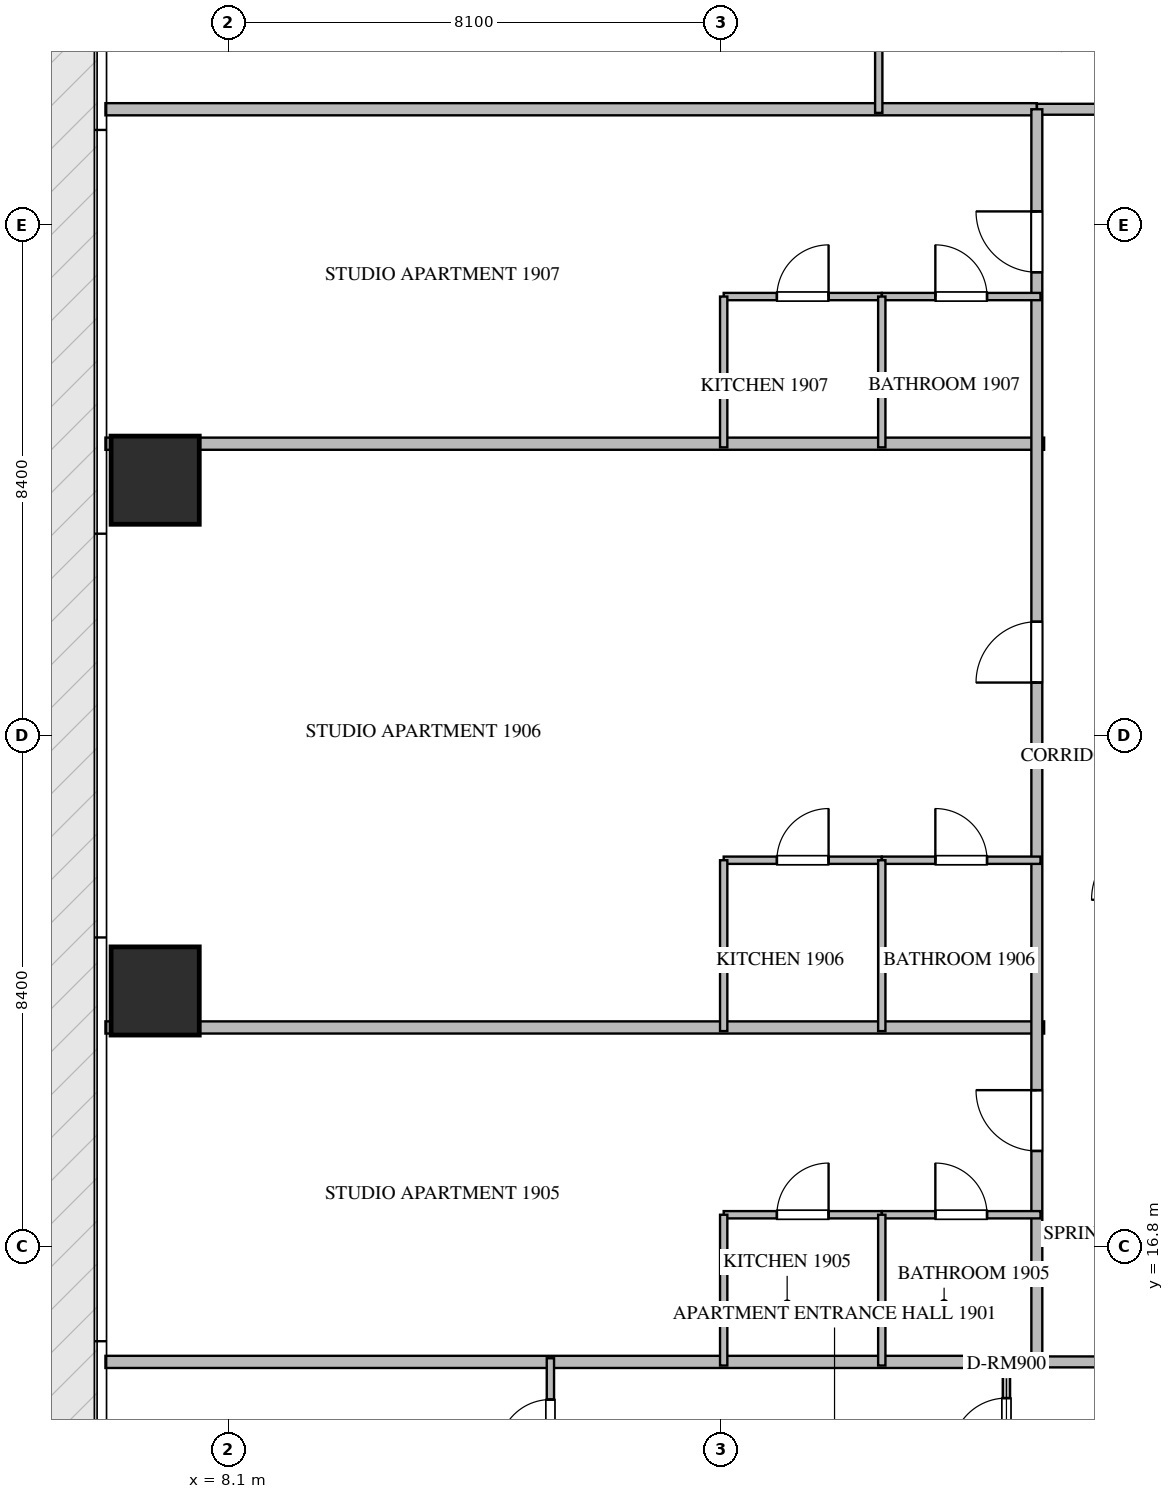
"""IFC4 building model, lengths in metres.
Left out: names, types, materials, properties, quantities, classifications, styles, units other than length and angle.
Written with IfcOpenShell. Run it as: python <this file> out.ifc"""

import sys

from ifc_helpers import new_model, si_unit, direction, frame, frame_2d, origin, origin_2d, place, context, subcontext, project, spatial, rectangle, extrude, source, transform, mapped, element, fill, save


model = new_model("IFC4")
c1 = context("Model", 3, precision=1e-05, world=origin(), true_north=direction((0.0, 1.0)))
c2 = subcontext(c1, "Body", "Model", "MODEL_VIEW")
j1 = project(units=[si_unit("LENGTHUNIT", "METRE"), si_unit("PLANEANGLEUNIT", "RADIAN")], contexts=[c1])
p1 = place(None, origin())
s1 = spatial("IfcSite", under=j1, at=p1, CompositionType="ELEMENT")
p2 = place(p1, origin())
s2 = spatial("IfcBuilding", under=s1, at=p2, CompositionType="ELEMENT")
p3 = place(p2, frame((0.0, 0.0, 79.2)))
s3 = spatial("IfcBuildingStorey", under=s2, at=p3, CompositionType="ELEMENT", Elevation=79.2)
m1 = source(origin(), c2, "Body", "SweptSolid", [
    extrude(rectangle(XDim=1.45, YDim=1.45, at=origin_2d()), origin(), (0.0, 0.0, 1.0), 3.75),
])
for number, where, z_axis, x_axis in (
    (1, (6.9, 21.0, -0.26), (0.0, 0.0, 1.0), (1.0, 0.0, 0.0)),
    (2, (6.9, 29.4, -0.26), (0.0, 0.0, 1.0), (1.0, 0.0, 0.0)),
):
    element("IfcColumn", number, at=place(p3, frame(where, z_axis=z_axis, x_axis=x_axis)), inside=s3, PredefinedType="COLUMN", context=c2, shape_type="MappedRepresentation", body=[
        mapped(m1, transform((0.0, 0.0, 0.0), scale=1.0)),
    ])
for number, where, z_axis, x_axis in (
    (3, (6.082, 20.4, 0.0), (0.0, 0.0, 1.0), (1.0, 0.0, 0.0)),
    (4, (6.082, 30.0, 0.0), (0.0, 0.0, 1.0), (1.0, 0.0, 0.0)),
):
    element("IfcWall", number, at=place(p3, frame(where, z_axis=z_axis, x_axis=x_axis)), inside=s3, PredefinedType="PARTITIONING", context=c2, shape_type="SweptSolid", body=[
        extrude(rectangle(XDim=15.438, YDim=0.2, at=frame_2d((7.719, 0.0))), origin(), (0.0, 0.0, 1.0), 3.49),
    ])
for number, where, z_axis, x_axis in (
    (5, (6.082, 14.9, 0.0), (0.0, 0.0, 1.0), (1.0, 0.0, 0.0)),
    (6, (6.082, 35.5, 0.0), (0.0, 0.0, 1.0), (1.0, 0.0, 0.0)),
):
    element("IfcWall", number, at=place(p3, frame(where, z_axis=z_axis, x_axis=x_axis)), inside=s3, PredefinedType="PARTITIONING", context=c2, shape_type="SweptSolid", body=[
        extrude(rectangle(XDim=15.318, YDim=0.2, at=frame_2d((7.659, 0.0))), origin(), (0.0, 0.0, 1.0), 3.49),
    ])
p4 = place(p3, frame((21.402, 14.9, 0.0), z_axis=(0.0, 0.0, 1.0), x_axis=(1.0, 0.0, 0.0)))
e7 = element("IfcWall", 7, at=p4, inside=s3, PredefinedType="PARTITIONING", context=c2, shape_type="SweptSolid", body=[
    extrude(rectangle(XDim=21.996, YDim=0.18, at=frame_2d((10.998, 0.0))), origin(), (0.0, 0.0, 1.0), 3.49),
])
p5 = place(p4, frame((4.724, 0.0, 0.0)))
e8 = element("IfcOpeningElement", 8, at=p5, cuts=e7, PredefinedType="OPENING", context=c2, shape_type="SweptSolid", body=[
    extrude(rectangle(XDim=1.0, YDim=2.15, at=frame_2d((0.5, 1.075))), frame((0.0, 0.1, 0.0), z_axis=(0.0, -1.0, 0.0), x_axis=(1.0, 0.0, 0.0)), (0.0, 0.0, 1.0), 0.2),
])
p6 = place(p4, frame((10.498, 0.0, 0.0)))
e9 = element("IfcOpeningElement", 9, at=p6, cuts=e7, PredefinedType="OPENING", context=c2, shape_type="SweptSolid", body=[
    extrude(rectangle(XDim=1.0, YDim=2.15, at=frame_2d((0.5, 1.075))), frame((0.0, 0.1, 0.0), z_axis=(0.0, -1.0, 0.0), x_axis=(1.0, 0.0, 0.0)), (0.0, 0.0, 1.0), 0.2),
])
p7 = place(p3, frame((21.402, 35.5, 0.0), z_axis=(0.0, 0.0, 1.0), x_axis=(1.0, 0.0, 0.0)))
e10 = element("IfcWall", 10, at=p7, inside=s3, PredefinedType="PARTITIONING", context=c2, shape_type="SweptSolid", body=[
    extrude(rectangle(XDim=21.996, YDim=0.18, at=frame_2d((10.998, 0.0))), origin(), (0.0, 0.0, 1.0), 3.49),
])
p8 = place(p7, frame((10.498, 0.0, 0.0)))
e11 = element("IfcOpeningElement", 11, at=p8, cuts=e10, PredefinedType="OPENING", context=c2, shape_type="SweptSolid", body=[
    extrude(rectangle(XDim=1.0, YDim=2.15, at=frame_2d((0.5, 1.075))), frame((0.0, 0.1, 0.0), z_axis=(0.0, -1.0, 0.0), x_axis=(1.0, 0.0, 0.0)), (0.0, 0.0, 1.0), 0.2),
])
p9 = place(p7, frame((16.272, 0.0, 0.0)))
e12 = element("IfcOpeningElement", 12, at=p9, cuts=e10, PredefinedType="OPENING", context=c2, shape_type="SweptSolid", body=[
    extrude(rectangle(XDim=1.0, YDim=2.15, at=frame_2d((0.5, 1.075))), frame((0.0, 0.1, 0.0), z_axis=(0.0, -1.0, 0.0), x_axis=(1.0, 0.0, 0.0)), (0.0, 0.0, 1.0), 0.2),
])
p10 = place(p3, frame((21.4, 14.9, 0.0), z_axis=(0.0, 0.0, 1.0), x_axis=(0.0, 1.0, 0.0)))
e13 = element("IfcWall", 13, at=p10, inside=s3, PredefinedType="PARTITIONING", context=c2, shape_type="SweptSolid", body=[
    extrude(rectangle(XDim=20.6, YDim=0.18, at=frame_2d((10.3, 0.0))), origin(), (0.0, 0.0, 1.0), 3.49),
])
p11 = place(p10, frame((3.469, 0.0, 0.0)))
e14 = element("IfcOpeningElement", 14, at=p11, cuts=e13, PredefinedType="OPENING", context=c2, shape_type="SweptSolid", body=[
    extrude(rectangle(XDim=1.0, YDim=2.15, at=frame_2d((0.5, 1.075))), frame((0.0, 0.1, 0.0), z_axis=(0.0, -1.0, 0.0), x_axis=(1.0, 0.0, 0.0)), (0.0, 0.0, 1.0), 0.2),
])
p12 = place(p10, frame((11.172, 0.0, 0.0)))
e15 = element("IfcOpeningElement", 15, at=p12, cuts=e13, PredefinedType="OPENING", context=c2, shape_type="SweptSolid", body=[
    extrude(rectangle(XDim=1.0, YDim=2.15, at=frame_2d((0.5, 1.075))), frame((0.0, 0.1, 0.0), z_axis=(0.0, -1.0, 0.0), x_axis=(1.0, 0.0, 0.0)), (0.0, 0.0, 1.0), 0.2),
])
p13 = place(p10, frame((17.92, 0.0, 0.0)))
e16 = element("IfcOpeningElement", 16, at=p13, cuts=e13, PredefinedType="OPENING", context=c2, shape_type="SweptSolid", body=[
    extrude(rectangle(XDim=1.0, YDim=2.15, at=frame_2d((0.5, 1.075))), frame((0.0, 0.1, 0.0), z_axis=(0.0, -1.0, 0.0), x_axis=(1.0, 0.0, 0.0)), (0.0, 0.0, 1.0), 0.2),
])
p14 = place(p3, frame((20.9, 12.75, 0.0), z_axis=(0.0, 0.0, 1.0), x_axis=(0.0, 1.0, 0.0)))
e17 = element("IfcWall", 17, at=p14, inside=s3, PredefinedType="PARTITIONING", context=c2, shape_type="SweptSolid", body=[
    extrude(rectangle(XDim=2.21, YDim=0.12, at=frame_2d((1.105, 0.0))), origin(), (0.0, 0.0, 1.0), 3.49),
])
p15 = place(p14, frame((0.655, 0.0, 0.0)))
e18 = element("IfcOpeningElement", 18, at=p15, cuts=e17, PredefinedType="OPENING", context=c2, shape_type="SweptSolid", body=[
    extrude(rectangle(XDim=0.9, YDim=2.1, at=frame_2d((0.45, 1.05))), frame((0.0, 0.07, 0.0), z_axis=(0.0, -1.0, 0.0), x_axis=(1.0, 0.0, 0.0)), (0.0, 0.0, 1.0), 0.14),
])
p16 = place(p3, frame((13.4, 12.752, 0.0), z_axis=(0.0, 0.0, 1.0), x_axis=(0.0, 1.0, 0.0)))
e19 = element("IfcWall", 19, at=p16, inside=s3, PredefinedType="PARTITIONING", context=c2, shape_type="SweptSolid", body=[
    extrude(rectangle(XDim=2.208, YDim=0.12, at=frame_2d((1.104, 0.0))), origin(), (0.0, 0.0, 1.0), 3.49),
])
p17 = place(p16, frame((0.679, 0.0, 0.0)))
e20 = element("IfcOpeningElement", 20, at=p17, cuts=e19, PredefinedType="OPENING", context=c2, shape_type="SweptSolid", body=[
    extrude(rectangle(XDim=0.85, YDim=2.1, at=frame_2d((0.425, 1.05))), frame((0.0, 0.07, 0.0), z_axis=(0.0, -1.0, 0.0), x_axis=(1.0, 0.0, 0.0)), (0.0, 0.0, 1.0), 0.14),
])
p18 = place(p3, frame((18.8, 37.648, 0.0), z_axis=(0.0, 0.0, 1.0), x_axis=(0.0, -1.0, 0.0)))
e21 = element("IfcWall", 21, at=p18, inside=s3, PredefinedType="PARTITIONING", context=c2, shape_type="SweptSolid", body=[
    extrude(rectangle(XDim=2.208, YDim=0.12, at=frame_2d((1.104, 0.0))), origin(), (0.0, 0.0, 1.0), 3.49),
])
p19 = place(p3, frame((16.25, 17.32, 0.0), z_axis=(0.0, 0.0, 1.0), x_axis=(1.0, 0.0, 0.0)))
e22 = element("IfcWall", 22, at=p19, inside=s3, PredefinedType="PARTITIONING", context=c2, shape_type="SweptSolid", body=[
    extrude(rectangle(XDim=2.6, YDim=0.12, at=frame_2d((1.3, 0.0))), origin(), (0.0, 0.0, 1.0), 3.49),
])
p20 = place(p19, frame((0.875, 0.0, 0.0)))
e23 = element("IfcOpeningElement", 23, at=p20, cuts=e22, PredefinedType="OPENING", context=c2, shape_type="SweptSolid", body=[
    extrude(rectangle(XDim=0.85, YDim=2.1, at=frame_2d((0.425, 1.05))), frame((0.0, 0.07, 0.0), z_axis=(0.0, -1.0, 0.0), x_axis=(1.0, 0.0, 0.0)), (0.0, 0.0, 1.0), 0.14),
])
p21 = place(p3, frame((18.852, 17.32, 0.0), z_axis=(0.0, 0.0, 1.0), x_axis=(1.0, 0.0, 0.0)))
e24 = element("IfcWall", 24, at=p21, inside=s3, PredefinedType="PARTITIONING", context=c2, shape_type="SweptSolid", body=[
    extrude(rectangle(XDim=2.608, YDim=0.12, at=frame_2d((1.304, 0.0))), origin(), (0.0, 0.0, 1.0), 3.49),
])
p22 = place(p21, frame((0.879, 0.0, 0.0)))
e25 = element("IfcOpeningElement", 25, at=p22, cuts=e24, PredefinedType="OPENING", context=c2, shape_type="SweptSolid", body=[
    extrude(rectangle(XDim=0.85, YDim=2.1, at=frame_2d((0.425, 1.05))), frame((0.0, 0.07, 0.0), z_axis=(0.0, -1.0, 0.0), x_axis=(1.0, 0.0, 0.0)), (0.0, 0.0, 1.0), 0.14),
])
for number, where, z_axis, x_axis in (
    (26, (18.85, 14.84, 0.0), (0.0, 0.0, 1.0), (0.0, 1.0, 0.0)),
    (27, (16.25, 14.84, 0.0), (0.0, 0.0, 1.0), (0.0, 1.0, 0.0)),
):
    element("IfcWall", number, at=place(p3, frame(where, z_axis=z_axis, x_axis=x_axis)), inside=s3, PredefinedType="PARTITIONING", context=c2, shape_type="SweptSolid", body=[
        extrude(rectangle(XDim=2.48, YDim=0.12, at=frame_2d((1.24, 0.0))), origin(), (0.0, 0.0, 1.0), 3.49),
    ])
p23 = place(p3, frame((16.25, 23.15, 0.0), z_axis=(0.0, 0.0, 1.0), x_axis=(1.0, 0.0, 0.0)))
e28 = element("IfcWall", 28, at=p23, inside=s3, PredefinedType="PARTITIONING", context=c2, shape_type="SweptSolid", body=[
    extrude(rectangle(XDim=2.6, YDim=0.12, at=frame_2d((1.3, 0.0))), origin(), (0.0, 0.0, 1.0), 3.49),
])
p24 = place(p23, frame((0.875, 0.0, 0.0)))
e29 = element("IfcOpeningElement", 29, at=p24, cuts=e28, PredefinedType="OPENING", context=c2, shape_type="SweptSolid", body=[
    extrude(rectangle(XDim=0.85, YDim=2.1, at=frame_2d((0.425, 1.05))), frame((0.0, 0.07, 0.0), z_axis=(0.0, -1.0, 0.0), x_axis=(1.0, 0.0, 0.0)), (0.0, 0.0, 1.0), 0.14),
])
p25 = place(p3, frame((18.852, 23.15, 0.0), z_axis=(0.0, 0.0, 1.0), x_axis=(1.0, 0.0, 0.0)))
e30 = element("IfcWall", 30, at=p25, inside=s3, PredefinedType="PARTITIONING", context=c2, shape_type="SweptSolid", body=[
    extrude(rectangle(XDim=2.608, YDim=0.12, at=frame_2d((1.304, 0.0))), origin(), (0.0, 0.0, 1.0), 3.49),
])
p26 = place(p25, frame((0.879, 0.0, 0.0)))
e31 = element("IfcOpeningElement", 31, at=p26, cuts=e30, PredefinedType="OPENING", context=c2, shape_type="SweptSolid", body=[
    extrude(rectangle(XDim=0.85, YDim=2.1, at=frame_2d((0.425, 1.05))), frame((0.0, 0.07, 0.0), z_axis=(0.0, -1.0, 0.0), x_axis=(1.0, 0.0, 0.0)), (0.0, 0.0, 1.0), 0.14),
])
for number, where, z_axis, x_axis in (
    (32, (18.85, 20.34, 0.0), (0.0, 0.0, 1.0), (0.0, 1.0, 0.0)),
    (33, (16.25, 20.34, 0.0), (0.0, 0.0, 1.0), (0.0, 1.0, 0.0)),
):
    element("IfcWall", number, at=place(p3, frame(where, z_axis=z_axis, x_axis=x_axis)), inside=s3, PredefinedType="PARTITIONING", context=c2, shape_type="SweptSolid", body=[
        extrude(rectangle(XDim=2.81, YDim=0.12, at=frame_2d((1.405, 0.0))), origin(), (0.0, 0.0, 1.0), 3.49),
    ])
p27 = place(p3, frame((16.25, 32.42, 0.0), z_axis=(0.0, 0.0, 1.0), x_axis=(1.0, 0.0, 0.0)))
e34 = element("IfcWall", 34, at=p27, inside=s3, PredefinedType="PARTITIONING", context=c2, shape_type="SweptSolid", body=[
    extrude(rectangle(XDim=2.6, YDim=0.12, at=frame_2d((1.3, 0.0))), origin(), (0.0, 0.0, 1.0), 3.49),
])
p28 = place(p27, frame((0.875, 0.0, 0.0)))
e35 = element("IfcOpeningElement", 35, at=p28, cuts=e34, PredefinedType="OPENING", context=c2, shape_type="SweptSolid", body=[
    extrude(rectangle(XDim=0.85, YDim=2.1, at=frame_2d((0.425, 1.05))), frame((0.0, 0.07, 0.0), z_axis=(0.0, -1.0, 0.0), x_axis=(1.0, 0.0, 0.0)), (0.0, 0.0, 1.0), 0.14),
])
p29 = place(p3, frame((18.852, 32.42, 0.0), z_axis=(0.0, 0.0, 1.0), x_axis=(1.0, 0.0, 0.0)))
e36 = element("IfcWall", 36, at=p29, inside=s3, PredefinedType="PARTITIONING", context=c2, shape_type="SweptSolid", body=[
    extrude(rectangle(XDim=2.608, YDim=0.12, at=frame_2d((1.304, 0.0))), origin(), (0.0, 0.0, 1.0), 3.49),
])
p30 = place(p29, frame((0.879, 0.0, 0.0)))
e37 = element("IfcOpeningElement", 37, at=p30, cuts=e36, PredefinedType="OPENING", context=c2, shape_type="SweptSolid", body=[
    extrude(rectangle(XDim=0.85, YDim=2.1, at=frame_2d((0.425, 1.05))), frame((0.0, 0.07, 0.0), z_axis=(0.0, -1.0, 0.0), x_axis=(1.0, 0.0, 0.0)), (0.0, 0.0, 1.0), 0.14),
])
for number, where, z_axis, x_axis in (
    (38, (18.85, 29.94, 0.0), (0.0, 0.0, 1.0), (0.0, 1.0, 0.0)),
    (39, (16.25, 29.94, 0.0), (0.0, 0.0, 1.0), (0.0, 1.0, 0.0)),
):
    element("IfcWall", number, at=place(p3, frame(where, z_axis=z_axis, x_axis=x_axis)), inside=s3, PredefinedType="PARTITIONING", context=c2, shape_type="SweptSolid", body=[
        extrude(rectangle(XDim=2.48, YDim=0.12, at=frame_2d((1.24, 0.0))), origin(), (0.0, 0.0, 1.0), 3.49),
    ])
m2 = source(origin(), c2, "Body", "SweptSolid", [
    extrude(rectangle(XDim=1.0, YDim=2.15, at=frame_2d((0.5, 1.075))), frame((0.0, 0.025, 0.0), z_axis=(0.0, -1.0, 0.0), x_axis=(1.0, 0.0, 0.0)), (0.0, 0.0, 1.0), 0.05),
])
p31 = place(p11, origin())
e40 = element("IfcDoor", 40, at=p31, inside=s3, OperationType="SINGLE_SWING_RIGHT", PredefinedType="DOOR", context=c2, shape_type="MappedRepresentation", body=[
    mapped(m2, transform((0.0, 0.0, 0.0), scale=1.0)),
])
fill(e14, e40)
p32 = place(p12, origin())
e41 = element("IfcDoor", 41, at=p32, inside=s3, OperationType="SINGLE_SWING_LEFT", PredefinedType="DOOR", context=c2, shape_type="MappedRepresentation", body=[
    mapped(m2, transform((0.0, 0.0, 0.0), scale=1.0)),
])
fill(e15, e41)
p33 = place(p13, origin())
e42 = element("IfcDoor", 42, at=p33, inside=s3, OperationType="SINGLE_SWING_RIGHT", PredefinedType="DOOR", context=c2, shape_type="MappedRepresentation", body=[
    mapped(m2, transform((0.0, 0.0, 0.0), scale=1.0)),
])
fill(e16, e42)
m3 = source(origin(), c2, "Body", "SweptSolid", [
    extrude(rectangle(XDim=0.9, YDim=2.1, at=frame_2d((0.45, 1.05))), frame((0.0, 0.025, 0.0), z_axis=(0.0, -1.0, 0.0), x_axis=(1.0, 0.0, 0.0)), (0.0, 0.0, 1.0), 0.05),
])
p34 = place(p15, origin())
e43 = element("IfcDoor", 43, at=p34, inside=s3, OperationType="SINGLE_SWING_LEFT", PredefinedType="DOOR", context=c2, shape_type="MappedRepresentation", body=[
    mapped(m3, transform((0.0, 0.0, 0.0), scale=1.0)),
])
fill(e18, e43)
m4 = source(origin(), c2, "Body", "SweptSolid", [
    extrude(rectangle(XDim=0.85, YDim=2.1, at=frame_2d((0.425, 1.05))), frame((0.0, 0.025, 0.0), z_axis=(0.0, -1.0, 0.0), x_axis=(1.0, 0.0, 0.0)), (0.0, 0.0, 1.0), 0.05),
])
p35 = place(p17, origin())
e44 = element("IfcDoor", 44, at=p35, inside=s3, OperationType="SINGLE_SWING_LEFT", PredefinedType="DOOR", context=c2, shape_type="MappedRepresentation", body=[
    mapped(m4, transform((0.0, 0.0, 0.0), scale=1.0)),
])
fill(e20, e44)
p36 = place(p20, origin())
e45 = element("IfcDoor", 45, at=p36, inside=s3, OperationType="SINGLE_SWING_RIGHT", PredefinedType="DOOR", context=c2, shape_type="MappedRepresentation", body=[
    mapped(m4, transform((0.0, 0.0, 0.0), scale=1.0)),
])
fill(e23, e45)
p37 = place(p22, origin())
e46 = element("IfcDoor", 46, at=p37, inside=s3, OperationType="SINGLE_SWING_LEFT", PredefinedType="DOOR", context=c2, shape_type="MappedRepresentation", body=[
    mapped(m4, transform((0.0, 0.0, 0.0), scale=1.0)),
])
fill(e25, e46)
p38 = place(p24, origin())
e47 = element("IfcDoor", 47, at=p38, inside=s3, OperationType="SINGLE_SWING_RIGHT", PredefinedType="DOOR", context=c2, shape_type="MappedRepresentation", body=[
    mapped(m4, transform((0.0, 0.0, 0.0), scale=1.0)),
])
fill(e29, e47)
p39 = place(p26, origin())
e48 = element("IfcDoor", 48, at=p39, inside=s3, OperationType="SINGLE_SWING_LEFT", PredefinedType="DOOR", context=c2, shape_type="MappedRepresentation", body=[
    mapped(m4, transform((0.0, 0.0, 0.0), scale=1.0)),
])
fill(e31, e48)
p40 = place(p28, origin())
e49 = element("IfcDoor", 49, at=p40, inside=s3, OperationType="SINGLE_SWING_RIGHT", PredefinedType="DOOR", context=c2, shape_type="MappedRepresentation", body=[
    mapped(m4, transform((0.0, 0.0, 0.0), scale=1.0)),
])
fill(e35, e49)
p41 = place(p30, origin())
e50 = element("IfcDoor", 50, at=p41, inside=s3, OperationType="SINGLE_SWING_LEFT", PredefinedType="DOOR", context=c2, shape_type="MappedRepresentation", body=[
    mapped(m4, transform((0.0, 0.0, 0.0), scale=1.0)),
])
fill(e37, e50)
save(model, sys.argv[1])
